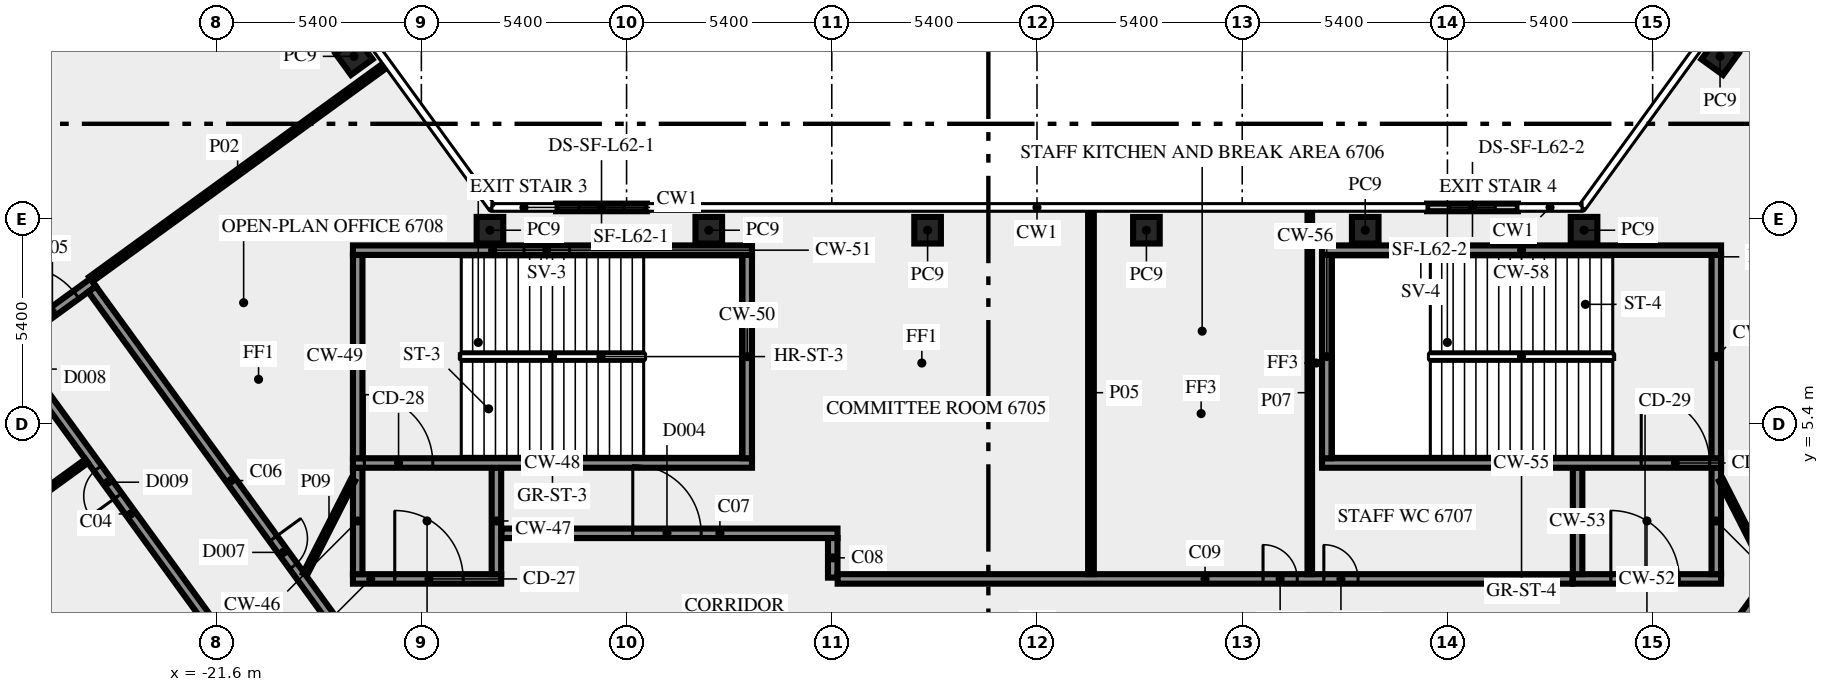
"""IFC4 building model, lengths in metres.
Left out: names, types, materials, properties, quantities, classifications, styles, units other than length and angle.
Written with IfcOpenShell. Run it as: python <this file> out.ifc"""

import sys

from ifc_helpers import new_model, si_unit, direction, frame, frame_2d, origin, origin_2d, place, context, subcontext, project, spatial, rectangle, extrude, element, fill, save


model = new_model("IFC4")
c1 = context("Model", 3, precision=1e-05, world=origin(), true_north=direction((0.0, 1.0)))
c2 = subcontext(c1, "Body", "Model", "MODEL_VIEW")
j1 = project(units=[si_unit("LENGTHUNIT", "METRE"), si_unit("PLANEANGLEUNIT", "RADIAN")], contexts=[c1])
p1 = place(None, origin())
s1 = spatial("IfcSite", under=j1, at=p1, CompositionType="ELEMENT")
p2 = place(p1, origin())
s2 = spatial("IfcBuilding", under=s1, at=p2, CompositionType="ELEMENT")
p3 = place(p2, frame((0.0, 0.0, 289.0)))
s3 = spatial("IfcBuildingStorey", under=s2, at=p3, CompositionType="ELEMENT", Elevation=289.0)
for number, where, z_axis, x_axis in (
    (1, (-17.974, 15.075, 0.0), (0.0, 0.0, 1.0), (-0.588, 0.809, 0.0)),
    (2, (17.974, 15.075, 0.0), (0.0, 0.0, 1.0), (-0.588, -0.809, 0.0)),
    (3, (14.395, 10.5, 0.0), (0.0, 0.0, 1.0), (-1.0, 0.0, 0.0)),
    (4, (8.637, 10.5, 0.0), (0.0, 0.0, 1.0), (-1.0, 0.0, 0.0)),
    (5, (2.879, 10.5, 0.0), (0.0, 0.0, 1.0), (-1.0, 0.0, 0.0)),
    (6, (-2.879, 10.5, 0.0), (0.0, 0.0, 1.0), (-1.0, 0.0, 0.0)),
    (7, (-8.637, 10.5, 0.0), (0.0, 0.0, 1.0), (-1.0, 0.0, 0.0)),
    (8, (-14.395, 10.5, 0.0), (0.0, 0.0, 1.0), (-1.0, 0.0, 0.0)),
):
    element("IfcColumn", number, at=place(p3, frame(where, z_axis=z_axis, x_axis=x_axis)), inside=s3, PredefinedType="COLUMN", context=c2, shape_type="SweptSolid", body=[
        extrude(rectangle(XDim=0.7, YDim=0.7, at=origin_2d()), origin(), (0.0, 0.0, 1.0), 3.65),
    ])
p4 = place(p3, frame((12.655, 11.1, 0.0), z_axis=(0.0, 0.0, 1.0), x_axis=(-1.0, 0.0, 0.0)))
e9 = element("IfcWall", 9, at=p4, inside=s3, PredefinedType="SOLIDWALL", context=c2, shape_type="SweptSolid", body=[
    extrude(rectangle(XDim=2.392, YDim=0.2, at=frame_2d((1.196, 0.0))), origin(), (0.0, 0.0, 1.0), 3.65),
])
p5 = place(p4, frame((0.596, 0.0, 1.0)))
e10 = element("IfcOpeningElement", 10, at=p5, cuts=e9, PredefinedType="OPENING", context=c2, shape_type="SweptSolid", body=[
    extrude(rectangle(XDim=1.2, YDim=1.2, at=frame_2d((0.6, 0.6))), frame((0.0, 0.11, 0.0), z_axis=(0.0, -1.0, 0.0), x_axis=(1.0, 0.0, 0.0)), (0.0, 0.0, 1.0), 0.22),
])
p6 = place(p3, frame((-10.263, 11.1, 0.0), z_axis=(0.0, 0.0, 1.0), x_axis=(-1.0, 0.0, 0.0)))
e11 = element("IfcWall", 11, at=p6, inside=s3, PredefinedType="SOLIDWALL", context=c2, shape_type="SweptSolid", body=[
    extrude(rectangle(XDim=2.392, YDim=0.2, at=frame_2d((1.196, 0.0))), origin(), (0.0, 0.0, 1.0), 3.65),
])
p7 = place(p6, frame((0.596, 0.0, 1.0)))
e12 = element("IfcOpeningElement", 12, at=p7, cuts=e11, PredefinedType="OPENING", context=c2, shape_type="SweptSolid", body=[
    extrude(rectangle(XDim=1.2, YDim=1.2, at=frame_2d((0.6, 0.6))), frame((0.0, 0.11, 0.0), z_axis=(0.0, -1.0, 0.0), x_axis=(1.0, 0.0, 0.0)), (0.0, 0.0, 1.0), 0.22),
])
p8 = place(p3, frame((-18.0, 1.325, 0.0), z_axis=(0.0, 0.0, 1.0), x_axis=(1.0, 0.0, 0.0)))
e13 = element("IfcWall", 13, at=p8, inside=s3, PredefinedType="SHEAR", context=c2, shape_type="SweptSolid", body=[
    extrude(rectangle(XDim=3.9, YDim=0.25, at=frame_2d((1.95, 0.0))), origin(), (0.0, 0.0, 1.0), 3.65),
])
p9 = place(p8, frame((1.1, 0.0, 0.0)))
e14 = element("IfcOpeningElement", 14, at=p9, cuts=e13, PredefinedType="OPENING", context=c2, shape_type="SweptSolid", body=[
    extrude(rectangle(XDim=1.8, YDim=2.1, at=frame_2d((0.9, 1.05))), frame((0.0, 0.135, 0.0), z_axis=(0.0, -1.0, 0.0), x_axis=(1.0, 0.0, 0.0)), (0.0, 0.0, 1.0), 0.27),
])
for number, where, z_axis, x_axis in (
    (15, (-17.875, 1.45, 0.0), (0.0, 0.0, 1.0), (0.0, 1.0, 0.0)),
    (16, (-14.225, 1.45, 0.0), (0.0, 0.0, 1.0), (0.0, 1.0, 0.0)),
):
    element("IfcWall", number, at=place(p3, frame(where, z_axis=z_axis, x_axis=x_axis)), inside=s3, PredefinedType="SHEAR", context=c2, shape_type="SweptSolid", body=[
        extrude(rectangle(XDim=2.8, YDim=0.25, at=frame_2d((1.4, 0.0))), origin(), (0.0, 0.0, 1.0), 3.65),
    ])
p10 = place(p3, frame((-18.0, 4.375, 0.0), z_axis=(0.0, 0.0, 1.0), x_axis=(1.0, 0.0, 0.0)))
e17 = element("IfcWall", 17, at=p10, inside=s3, PredefinedType="SHEAR", context=c2, shape_type="SweptSolid", body=[
    extrude(rectangle(XDim=10.5, YDim=0.25, at=frame_2d((5.25, 0.0))), origin(), (0.0, 0.0, 1.0), 3.65),
])
p11 = place(p10, frame((0.3, 0.0, 0.0)))
e18 = element("IfcOpeningElement", 18, at=p11, cuts=e17, PredefinedType="OPENING", context=c2, shape_type="SweptSolid", body=[
    extrude(rectangle(XDim=1.8, YDim=2.1, at=frame_2d((0.9, 1.05))), frame((0.0, 0.135, 0.0), z_axis=(0.0, -1.0, 0.0), x_axis=(1.0, 0.0, 0.0)), (0.0, 0.0, 1.0), 0.27),
])
for number, where, z_axis, x_axis in (
    (19, (-17.875, 4.5, 0.0), (0.0, 0.0, 1.0), (0.0, 1.0, 0.0)),
    (20, (-7.625, 4.5, 0.0), (0.0, 0.0, 1.0), (0.0, 1.0, 0.0)),
):
    element("IfcWall", number, at=place(p3, frame(where, z_axis=z_axis, x_axis=x_axis)), inside=s3, PredefinedType="SHEAR", context=c2, shape_type="SweptSolid", body=[
        extrude(rectangle(XDim=5.35, YDim=0.25, at=frame_2d((2.675, 0.0))), origin(), (0.0, 0.0, 1.0), 3.65),
    ])
p12 = place(p3, frame((-18.0, 9.975, 0.0), z_axis=(0.0, 0.0, 1.0), x_axis=(1.0, 0.0, 0.0)))
e21 = element("IfcWall", 21, at=p12, inside=s3, PredefinedType="SHEAR", context=c2, shape_type="SweptSolid", body=[
    extrude(rectangle(XDim=10.5, YDim=0.25, at=frame_2d((5.25, 0.0))), origin(), (0.0, 0.0, 1.0), 3.65),
])
p13 = place(p12, frame((4.5, 0.0, 1.0)))
e22 = element("IfcOpeningElement", 22, at=p13, cuts=e21, PredefinedType="OPENING", context=c2, shape_type="SweptSolid", body=[
    extrude(rectangle(XDim=1.2, YDim=1.2, at=frame_2d((0.6, 0.6))), frame((0.0, 0.135, 0.0), z_axis=(0.0, -1.0, 0.0), x_axis=(1.0, 0.0, 0.0)), (0.0, 0.0, 1.0), 0.27),
])
p14 = place(p3, frame((14.1, 1.325, 0.0), z_axis=(0.0, 0.0, 1.0), x_axis=(1.0, 0.0, 0.0)))
e23 = element("IfcWall", 23, at=p14, inside=s3, PredefinedType="SHEAR", context=c2, shape_type="SweptSolid", body=[
    extrude(rectangle(XDim=3.9, YDim=0.25, at=frame_2d((1.95, 0.0))), origin(), (0.0, 0.0, 1.0), 3.65),
])
p15 = place(p14, frame((1.0, 0.0, 0.0)))
e24 = element("IfcOpeningElement", 24, at=p15, cuts=e23, PredefinedType="OPENING", context=c2, shape_type="SweptSolid", body=[
    extrude(rectangle(XDim=1.8, YDim=2.1, at=frame_2d((0.9, 1.05))), frame((0.0, 0.135, 0.0), z_axis=(0.0, -1.0, 0.0), x_axis=(1.0, 0.0, 0.0)), (0.0, 0.0, 1.0), 0.27),
])
for number, where, z_axis, x_axis in (
    (25, (14.225, 1.45, 0.0), (0.0, 0.0, 1.0), (0.0, 1.0, 0.0)),
    (26, (17.875, 1.45, 0.0), (0.0, 0.0, 1.0), (0.0, 1.0, 0.0)),
):
    element("IfcWall", number, at=place(p3, frame(where, z_axis=z_axis, x_axis=x_axis)), inside=s3, PredefinedType="SHEAR", context=c2, shape_type="SweptSolid", body=[
        extrude(rectangle(XDim=2.8, YDim=0.25, at=frame_2d((1.4, 0.0))), origin(), (0.0, 0.0, 1.0), 3.65),
    ])
p16 = place(p3, frame((7.5, 4.375, 0.0), z_axis=(0.0, 0.0, 1.0), x_axis=(1.0, 0.0, 0.0)))
e27 = element("IfcWall", 27, at=p16, inside=s3, PredefinedType="SHEAR", context=c2, shape_type="SweptSolid", body=[
    extrude(rectangle(XDim=10.5, YDim=0.25, at=frame_2d((5.25, 0.0))), origin(), (0.0, 0.0, 1.0), 3.65),
])
p17 = place(p16, frame((8.4, 0.0, 0.0)))
e28 = element("IfcOpeningElement", 28, at=p17, cuts=e27, PredefinedType="OPENING", context=c2, shape_type="SweptSolid", body=[
    extrude(rectangle(XDim=1.8, YDim=2.1, at=frame_2d((0.9, 1.05))), frame((0.0, 0.135, 0.0), z_axis=(0.0, -1.0, 0.0), x_axis=(1.0, 0.0, 0.0)), (0.0, 0.0, 1.0), 0.27),
])
for number, where, z_axis, x_axis in (
    (29, (7.625, 4.5, 0.0), (0.0, 0.0, 1.0), (0.0, 1.0, 0.0)),
    (30, (17.875, 4.5, 0.0), (0.0, 0.0, 1.0), (0.0, 1.0, 0.0)),
):
    element("IfcWall", number, at=place(p3, frame(where, z_axis=z_axis, x_axis=x_axis)), inside=s3, PredefinedType="SHEAR", context=c2, shape_type="SweptSolid", body=[
        extrude(rectangle(XDim=5.35, YDim=0.25, at=frame_2d((2.675, 0.0))), origin(), (0.0, 0.0, 1.0), 3.65),
    ])
p18 = place(p3, frame((7.5, 9.975, 0.0), z_axis=(0.0, 0.0, 1.0), x_axis=(1.0, 0.0, 0.0)))
e31 = element("IfcWall", 31, at=p18, inside=s3, PredefinedType="SHEAR", context=c2, shape_type="SweptSolid", body=[
    extrude(rectangle(XDim=10.5, YDim=0.25, at=frame_2d((5.25, 0.0))), origin(), (0.0, 0.0, 1.0), 3.65),
])
p19 = place(p18, frame((2.0, 0.0, 1.0)))
e32 = element("IfcOpeningElement", 32, at=p19, cuts=e31, PredefinedType="OPENING", context=c2, shape_type="SweptSolid", body=[
    extrude(rectangle(XDim=1.2, YDim=1.2, at=frame_2d((0.6, 0.6))), frame((0.0, 0.135, 0.0), z_axis=(0.0, -1.0, 0.0), x_axis=(1.0, 0.0, 0.0)), (0.0, 0.0, 1.0), 0.27),
])
p20 = place(p3, frame((17.545, -1.125, 0.0), z_axis=(0.0, 0.0, 1.0), x_axis=(0.58779555165, 0.809009511354, 0.0)))
e33 = element("IfcWall", 33, at=p20, inside=s3, PredefinedType="SOLIDWALL", context=c2, shape_type="SweptSolid", body=[
    extrude(rectangle(XDim=18.103, YDim=0.25, at=frame_2d((9.052, 0.0))), origin(), (0.0, 0.0, 1.0), 3.65),
])
p21 = place(p20, frame((3.441, 0.0, 0.0)))
e34 = element("IfcOpeningElement", 34, at=p21, cuts=e33, PredefinedType="OPENING", context=c2, shape_type="SweptSolid", body=[
    extrude(rectangle(XDim=0.9, YDim=2.1, at=frame_2d((0.45, 1.05))), frame((0.0, 0.135, 0.0), z_axis=(0.0, -1.0, 0.0), x_axis=(1.0, 0.0, 0.0)), (0.0, 0.0, 1.0), 0.27),
])
p22 = place(p3, frame((-20.531, -1.523, 0.0), z_axis=(0.0, 0.0, 1.0), x_axis=(-0.587782646447, 0.809018887626, 0.0)))
e35 = element("IfcWall", 35, at=p22, inside=s3, PredefinedType="SOLIDWALL", context=c2, shape_type="SweptSolid", body=[
    extrude(rectangle(XDim=11.27, YDim=0.25, at=frame_2d((5.635, 0.0))), origin(), (0.0, 0.0, 1.0), 3.65),
])
p23 = place(p22, frame((6.216, 0.0, 0.0)))
e36 = element("IfcOpeningElement", 36, at=p23, cuts=e35, PredefinedType="OPENING", context=c2, shape_type="SweptSolid", body=[
    extrude(rectangle(XDim=0.9, YDim=2.1, at=frame_2d((0.45, 1.05))), frame((0.0, 0.135, 0.0), z_axis=(0.0, -1.0, 0.0), x_axis=(1.0, 0.0, 0.0)), (0.0, 0.0, 1.0), 0.27),
])
p24 = place(p22, frame((9.896, 0.0, 0.0)))
e37 = element("IfcOpeningElement", 37, at=p24, cuts=e35, PredefinedType="OPENING", context=c2, shape_type="SweptSolid", body=[
    extrude(rectangle(XDim=0.9, YDim=2.1, at=frame_2d((0.45, 1.05))), frame((0.0, 0.135, 0.0), z_axis=(0.0, -1.0, 0.0), x_axis=(1.0, 0.0, 0.0)), (0.0, 0.0, 1.0), 0.27),
])
p25 = place(p3, frame((-26.981, 7.567, 0.0), z_axis=(0.0, 0.0, 1.0), x_axis=(0.809038743598, 0.587755315891, 0.0)))
e38 = element("IfcWall", 38, at=p25, inside=s3, PredefinedType="SOLIDWALL", context=c2, shape_type="SweptSolid", body=[
    extrude(rectangle(XDim=2.65, YDim=0.25, at=frame_2d((1.325, 0.0))), origin(), (0.0, 0.0, 1.0), 3.65),
])
p26 = place(p25, frame((0.3, 0.0, 0.0)))
e39 = element("IfcOpeningElement", 39, at=p26, cuts=e38, PredefinedType="OPENING", context=c2, shape_type="SweptSolid", body=[
    extrude(rectangle(XDim=1.8, YDim=2.1, at=frame_2d((0.9, 1.05))), frame((0.0, 0.135, 0.0), z_axis=(0.0, -1.0, 0.0), x_axis=(1.0, 0.0, 0.0)), (0.0, 0.0, 1.0), 0.27),
])
p27 = place(p3, frame((-24.865, 8.95, 0.0), z_axis=(0.0, 0.0, 1.0), x_axis=(0.587791617212, -0.809012369952, 0.0)))
e40 = element("IfcWall", 40, at=p27, inside=s3, PredefinedType="SOLIDWALL", context=c2, shape_type="SweptSolid", body=[
    extrude(rectangle(XDim=12.453, YDim=0.25, at=frame_2d((6.227, 0.0))), origin(), (0.0, 0.0, 1.0), 3.65),
])
p28 = place(p27, frame((8.112, 0.0, 0.0)))
e41 = element("IfcOpeningElement", 41, at=p28, cuts=e40, PredefinedType="OPENING", context=c2, shape_type="SweptSolid", body=[
    extrude(rectangle(XDim=0.9, YDim=2.1, at=frame_2d((0.45, 1.05))), frame((0.0, 0.135, 0.0), z_axis=(0.0, -1.0, 0.0), x_axis=(1.0, 0.0, 0.0)), (0.0, 0.0, 1.0), 0.27),
])
p29 = place(p3, frame((-14.09, 2.525, 0.0), z_axis=(0.0, 0.0, 1.0), x_axis=(1.0, 0.0, 0.0)))
e42 = element("IfcWall", 42, at=p29, inside=s3, PredefinedType="SOLIDWALL", context=c2, shape_type="SweptSolid", body=[
    extrude(rectangle(XDim=8.84, YDim=0.25, at=frame_2d((4.42, 0.0))), origin(), (0.0, 0.0, 1.0), 3.65),
])
p30 = place(p29, frame((3.453, 0.0, 0.0)))
e43 = element("IfcOpeningElement", 43, at=p30, cuts=e42, PredefinedType="OPENING", context=c2, shape_type="SweptSolid", body=[
    extrude(rectangle(XDim=1.8, YDim=2.1, at=frame_2d((0.9, 1.05))), frame((0.0, 0.135, 0.0), z_axis=(0.0, -1.0, 0.0), x_axis=(1.0, 0.0, 0.0)), (0.0, 0.0, 1.0), 0.27),
])
p31 = place(p3, frame((-5.375, 2.4, 0.0), z_axis=(0.0, 0.0, 1.0), x_axis=(0.0, -1.0, 0.0)))
e44 = element("IfcWall", 44, at=p31, inside=s3, PredefinedType="SOLIDWALL", context=c2, shape_type="SweptSolid", body=[
    extrude(rectangle(XDim=1.041, YDim=0.25, at=frame_2d((0.521, 0.0))), origin(), (0.0, 0.0, 1.0), 3.65),
])
p32 = place(p3, frame((-5.246, 1.325, 0.0), z_axis=(0.0, 0.0, 1.0), x_axis=(1.0, 0.0, 0.0)))
e45 = element("IfcWall", 45, at=p32, inside=s3, PredefinedType="SOLIDWALL", context=c2, shape_type="SweptSolid", body=[
    extrude(rectangle(XDim=19.336, YDim=0.25, at=frame_2d((9.668, 0.0))), origin(), (0.0, 0.0, 1.0), 3.65),
])
p33 = place(p32, frame((11.194, 0.0, 0.0)))
e46 = element("IfcOpeningElement", 46, at=p33, cuts=e45, PredefinedType="OPENING", context=c2, shape_type="SweptSolid", body=[
    extrude(rectangle(XDim=0.9, YDim=2.1, at=frame_2d((0.45, 1.05))), frame((0.0, 0.135, 0.0), z_axis=(0.0, -1.0, 0.0), x_axis=(1.0, 0.0, 0.0)), (0.0, 0.0, 1.0), 0.27),
])
p34 = place(p32, frame((12.794, 0.0, 0.0)))
e47 = element("IfcOpeningElement", 47, at=p34, cuts=e45, PredefinedType="OPENING", context=c2, shape_type="SweptSolid", body=[
    extrude(rectangle(XDim=0.9, YDim=2.1, at=frame_2d((0.45, 1.05))), frame((0.0, 0.135, 0.0), z_axis=(0.0, -1.0, 0.0), x_axis=(1.0, 0.0, 0.0)), (0.0, 0.0, 1.0), 0.27),
])
p35 = place(p3, frame((-17.172, 14.823, 0.0), z_axis=(0.0, 0.0, 1.0), x_axis=(-0.809013490065, -0.587790075531, 0.0)))
e48 = element("IfcWall", 48, at=p35, inside=s3, PredefinedType="PARTITIONING", context=c2, shape_type="SweptSolid", body=[
    extrude(rectangle(XDim=9.549, YDim=0.15, at=frame_2d((4.775, 0.0))), origin(), (0.0, 0.0, 1.0), 2.95),
])
p36 = place(p3, frame((-25.008, 4.427, 0.0), z_axis=(0.0, 0.0, 1.0), x_axis=(-0.808994684961, -0.587815957341, 0.0)))
e49 = element("IfcWall", 49, at=p36, inside=s3, PredefinedType="PARTITIONING", context=c2, shape_type="SweptSolid", body=[
    extrude(rectangle(XDim=9.55, YDim=0.12, at=frame_2d((4.775, 0.0))), origin(), (0.0, 0.0, 1.0), 2.95),
])
p37 = place(p3, frame((1.42, 1.45, 0.0), z_axis=(0.0, 0.0, 1.0), x_axis=(0.0, 1.0, 0.0)))
e50 = element("IfcWall", 50, at=p37, inside=s3, PredefinedType="PARTITIONING", context=c2, shape_type="SweptSolid", body=[
    extrude(rectangle(XDim=9.55, YDim=0.15, at=frame_2d((4.775, 0.0))), origin(), (0.0, 0.0, 1.0), 2.95),
])
p38 = place(p3, frame((7.178, 1.45, 0.0), z_axis=(0.0, 0.0, 1.0), x_axis=(0.0, 1.0, 0.0)))
e51 = element("IfcWall", 51, at=p38, inside=s3, PredefinedType="PARTITIONING", context=c2, shape_type="SweptSolid", body=[
    extrude(rectangle(XDim=9.55, YDim=0.12, at=frame_2d((4.775, 0.0))), origin(), (0.0, 0.0, 1.0), 2.95),
])
for number, where, z_axis, x_axis in (
    (52, (18.0, 3.925, 0.0), (0.0, 0.0, 1.0), (0.454, -0.891, 0.0)),
    (53, (-19.261, 1.45, 0.0), (0.0, 0.0, 1.0), (0.454, 0.891, 0.0)),
):
    element("IfcWall", number, at=place(p3, frame(where, z_axis=z_axis, x_axis=x_axis)), inside=s3, PredefinedType="PARTITIONING", context=c2, shape_type="SweptSolid", body=[
        extrude(rectangle(XDim=2.778, YDim=0.12, at=frame_2d((1.389, 0.0))), origin(), (0.0, 0.0, 1.0), 3.65),
    ])
p39 = place(p5, origin())
e54 = element("IfcWindow", 54, at=p39, inside=s3, PartitioningType="SINGLE_PANEL", PredefinedType="WINDOW", context=c2, shape_type="SweptSolid", body=[
    extrude(rectangle(XDim=1.2, YDim=1.2, at=frame_2d((0.6, 0.6))), frame((0.0, 0.03, 0.0), z_axis=(0.0, -1.0, 0.0), x_axis=(1.0, 0.0, 0.0)), (0.0, 0.0, 1.0), 0.06),
])
fill(e10, e54)
p40 = place(p7, origin())
e55 = element("IfcWindow", 55, at=p40, inside=s3, PartitioningType="SINGLE_PANEL", PredefinedType="WINDOW", context=c2, shape_type="SweptSolid", body=[
    extrude(rectangle(XDim=1.2, YDim=1.2, at=frame_2d((0.6, 0.6))), frame((0.0, 0.03, 0.0), z_axis=(0.0, -1.0, 0.0), x_axis=(1.0, 0.0, 0.0)), (0.0, 0.0, 1.0), 0.06),
])
fill(e12, e55)
p41 = place(p9, origin())
e56 = element("IfcDoor", 56, at=p41, inside=s3, OperationType="DOUBLE_DOOR_SINGLE_SWING", PredefinedType="DOOR", context=c2, shape_type="SweptSolid", body=[
    extrude(rectangle(XDim=1.8, YDim=2.1, at=frame_2d((0.9, 1.05))), frame((0.0, 0.025, 0.0), z_axis=(0.0, -1.0, 0.0), x_axis=(1.0, 0.0, 0.0)), (0.0, 0.0, 1.0), 0.05),
])
fill(e14, e56)
p42 = place(p11, origin())
e57 = element("IfcDoor", 57, at=p42, inside=s3, OperationType="DOUBLE_DOOR_SINGLE_SWING", PredefinedType="DOOR", context=c2, shape_type="SweptSolid", body=[
    extrude(rectangle(XDim=1.8, YDim=2.1, at=frame_2d((0.9, 1.05))), frame((0.0, 0.025, 0.0), z_axis=(0.0, -1.0, 0.0), x_axis=(1.0, 0.0, 0.0)), (0.0, 0.0, 1.0), 0.05),
])
fill(e18, e57)
p43 = place(p13, origin())
e58 = element("IfcWindow", 58, at=p43, inside=s3, PartitioningType="SINGLE_PANEL", PredefinedType="WINDOW", context=c2, shape_type="SweptSolid", body=[
    extrude(rectangle(XDim=1.2, YDim=1.2, at=frame_2d((0.6, 0.6))), frame((0.0, 0.03, 0.0), z_axis=(0.0, -1.0, 0.0), x_axis=(1.0, 0.0, 0.0)), (0.0, 0.0, 1.0), 0.06),
])
fill(e22, e58)
p44 = place(p15, origin())
e59 = element("IfcDoor", 59, at=p44, inside=s3, OperationType="DOUBLE_DOOR_SINGLE_SWING", PredefinedType="DOOR", context=c2, shape_type="SweptSolid", body=[
    extrude(rectangle(XDim=1.8, YDim=2.1, at=frame_2d((0.9, 1.05))), frame((0.0, 0.025, 0.0), z_axis=(0.0, -1.0, 0.0), x_axis=(1.0, 0.0, 0.0)), (0.0, 0.0, 1.0), 0.05),
])
fill(e24, e59)
p45 = place(p17, origin())
e60 = element("IfcDoor", 60, at=p45, inside=s3, OperationType="DOUBLE_DOOR_SINGLE_SWING", PredefinedType="DOOR", context=c2, shape_type="SweptSolid", body=[
    extrude(rectangle(XDim=1.8, YDim=2.1, at=frame_2d((0.9, 1.05))), frame((0.0, 0.025, 0.0), z_axis=(0.0, -1.0, 0.0), x_axis=(1.0, 0.0, 0.0)), (0.0, 0.0, 1.0), 0.05),
])
fill(e28, e60)
p46 = place(p19, origin())
e61 = element("IfcWindow", 61, at=p46, inside=s3, PartitioningType="SINGLE_PANEL", PredefinedType="WINDOW", context=c2, shape_type="SweptSolid", body=[
    extrude(rectangle(XDim=1.2, YDim=1.2, at=frame_2d((0.6, 0.6))), frame((0.0, 0.03, 0.0), z_axis=(0.0, -1.0, 0.0), x_axis=(1.0, 0.0, 0.0)), (0.0, 0.0, 1.0), 0.06),
])
fill(e32, e61)
p47 = place(p28, origin())
e62 = element("IfcDoor", 62, at=p47, inside=s3, OperationType="SINGLE_SWING_RIGHT", PredefinedType="DOOR", context=c2, shape_type="SweptSolid", body=[
    extrude(rectangle(XDim=0.9, YDim=2.1, at=frame_2d((0.45, 1.05))), frame((0.0, 0.025, 0.0), z_axis=(0.0, -1.0, 0.0), x_axis=(1.0, 0.0, 0.0)), (0.0, 0.0, 1.0), 0.05),
])
fill(e41, e62)
p48 = place(p23, origin())
e63 = element("IfcDoor", 63, at=p48, inside=s3, OperationType="SINGLE_SWING_RIGHT", PredefinedType="DOOR", context=c2, shape_type="SweptSolid", body=[
    extrude(rectangle(XDim=0.9, YDim=2.1, at=frame_2d((0.45, 1.05))), frame((0.0, 0.025, 0.0), z_axis=(0.0, -1.0, 0.0), x_axis=(1.0, 0.0, 0.0)), (0.0, 0.0, 1.0), 0.05),
])
fill(e36, e63)
p49 = place(p30, origin())
e64 = element("IfcDoor", 64, at=p49, inside=s3, OperationType="DOUBLE_DOOR_SINGLE_SWING", PredefinedType="DOOR", context=c2, shape_type="SweptSolid", body=[
    extrude(rectangle(XDim=1.8, YDim=2.1, at=frame_2d((0.9, 1.05))), frame((0.0, 0.025, 0.0), z_axis=(0.0, -1.0, 0.0), x_axis=(1.0, 0.0, 0.0)), (0.0, 0.0, 1.0), 0.05),
])
fill(e43, e64)
p50 = place(p26, origin())
e65 = element("IfcDoor", 65, at=p50, inside=s3, OperationType="DOUBLE_DOOR_SINGLE_SWING", PredefinedType="DOOR", context=c2, shape_type="SweptSolid", body=[
    extrude(rectangle(XDim=1.8, YDim=2.1, at=frame_2d((0.9, 1.05))), frame((0.0, 0.025, 0.0), z_axis=(0.0, -1.0, 0.0), x_axis=(1.0, 0.0, 0.0)), (0.0, 0.0, 1.0), 0.05),
])
fill(e39, e65)
p51 = place(p33, origin())
e66 = element("IfcDoor", 66, at=p51, inside=s3, OperationType="SINGLE_SWING_RIGHT", PredefinedType="DOOR", context=c2, shape_type="SweptSolid", body=[
    extrude(rectangle(XDim=0.9, YDim=2.1, at=frame_2d((0.45, 1.05))), frame((0.0, 0.025, 0.0), z_axis=(0.0, -1.0, 0.0), x_axis=(1.0, 0.0, 0.0)), (0.0, 0.0, 1.0), 0.05),
])
fill(e46, e66)
p52 = place(p34, origin())
e67 = element("IfcDoor", 67, at=p52, inside=s3, OperationType="SINGLE_SWING_LEFT", PredefinedType="DOOR", context=c2, shape_type="SweptSolid", body=[
    extrude(rectangle(XDim=0.9, YDim=2.1, at=frame_2d((0.45, 1.05))), frame((0.0, 0.025, 0.0), z_axis=(0.0, -1.0, 0.0), x_axis=(1.0, 0.0, 0.0)), (0.0, 0.0, 1.0), 0.05),
])
fill(e47, e67)
save(model, sys.argv[1])
